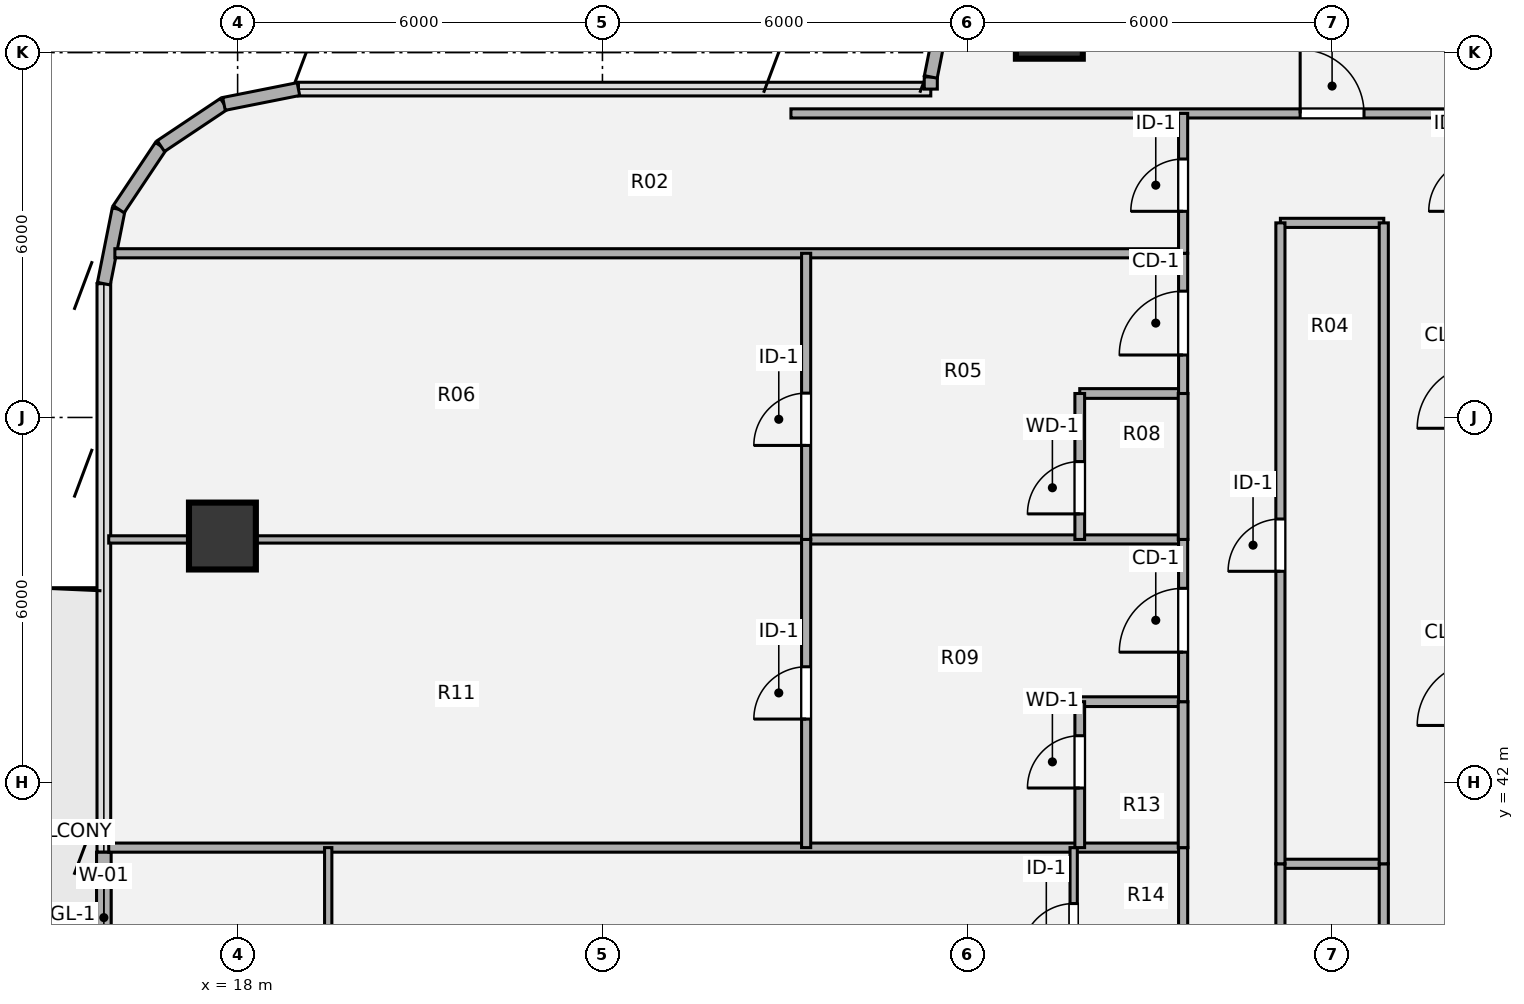
"""IFC4 building model, lengths in metres.
Left out: names, types, materials, properties, quantities, classifications, styles, units other than length and angle.
Written with IfcOpenShell. Run it as: python <this file> out.ifc"""

import sys

from ifc_helpers import new_model, si_unit, direction, frame, frame_2d, origin, origin_2d, place, context, subcontext, project, spatial, rectangle, hollow_circle, extrude, source, transform, mapped, element, fill, save


model = new_model("IFC4")
c1 = context("Model", 3, precision=1e-05, world=origin(), true_north=direction((0.0, 1.0)))
c2 = subcontext(c1, "Body", "Model", "MODEL_VIEW")
j1 = project(units=[si_unit("LENGTHUNIT", "METRE"), si_unit("PLANEANGLEUNIT", "RADIAN")], contexts=[c1])
p1 = place(None, origin())
s1 = spatial("IfcSite", under=j1, at=p1, CompositionType="ELEMENT")
p2 = place(p1, origin())
s2 = spatial("IfcBuilding", under=s1, at=p2, CompositionType="ELEMENT")
p3 = place(p2, frame((0.0, 0.0, 209.34)))
s3 = spatial("IfcBuildingStorey", under=s2, at=p3, CompositionType="ELEMENT", Elevation=209.34)
m1 = source(origin(), c2, "Body", "SweptSolid", [
    extrude(hollow_circle(Radius=0.55, WallThickness=0.04, at=origin_2d()), origin(), (0.0, 0.0, 1.0), 3.372),
])
for number, where, z_axis, x_axis in (
    (1, (17.75, 46.05, 0.0), (0.0, 0.0, 1.0), (1.0, 0.0, 0.0)),
    (2, (31.35, 54.45, 0.0), (0.0, 0.0, 1.0), (1.0, 0.0, 0.0)),
):
    element("IfcColumn", number, at=place(p3, frame(where, z_axis=z_axis, x_axis=x_axis)), inside=s3, PredefinedType="COLUMN", context=c2, shape_type="MappedRepresentation", body=[
        mapped(m1, transform((0.0, 0.0, 0.0), x_axis=(1.0, 0.0, 0.0), y_axis=(0.0, 1.0, 0.0), z_axis=(0.0, 0.0, 1.0), scale=1.0)),
    ])
p4 = place(p3, frame((15.8, 37.25, 0.0), z_axis=(0.0, 0.0, 1.0), x_axis=(0.0, 1.0, 0.0)))
e3 = element("IfcWall", 3, at=p4, inside=s3, PredefinedType="SOLIDWALL", context=c2, shape_type="SweptSolid", body=[
    extrude(rectangle(XDim=3.6, YDim=0.24, at=frame_2d((1.8, 0.0))), origin(), (0.0, 0.0, 1.0), 3.372),
])
p5 = place(p4, frame((0.4, 0.0, 0.0)))
e4 = element("IfcOpeningElement", 4, at=p5, cuts=e3, PredefinedType="OPENING", context=c2, shape_type="SweptSolid", body=[
    extrude(rectangle(XDim=1.05, YDim=2.15, at=origin_2d()), frame((0.525, 0.13, 1.075), z_axis=(0.0, -1.0, 0.0), x_axis=(1.0, 0.0, 0.0)), (0.0, 0.0, 1.0), 0.26),
])
p6 = place(p4, frame((1.85, 0.0, 0.85)))
e5 = element("IfcOpeningElement", 5, at=p6, cuts=e3, PredefinedType="OPENING", context=c2, shape_type="SweptSolid", body=[
    extrude(rectangle(XDim=1.35, YDim=1.35, at=origin_2d()), frame((0.675, 0.13, 0.675), z_axis=(0.0, -1.0, 0.0), x_axis=(1.0, 0.0, 0.0)), (0.0, 0.0, 1.0), 0.26),
])
for number, where, z_axis, x_axis in (
    (6, (15.8, 50.2, 0.0), (0.0, 0.0, 1.0), (0.195, 0.981, 0.0)),
    (7, (16.044, 51.425, 0.0), (0.0, 0.0, 1.0), (0.556, 0.831, 0.0)),
    (8, (16.737, 52.463, 0.0), (0.0, 0.0, 1.0), (0.831, 0.556, 0.0)),
    (9, (17.775, 53.156, 0.0), (0.0, 0.0, 1.0), (0.981, 0.195, 0.0)),
):
    element("IfcWall", number, at=place(p3, frame(where, z_axis=z_axis, x_axis=x_axis)), inside=s3, PredefinedType="SOLIDWALL", context=c2, shape_type="SweptSolid", body=[
        extrude(rectangle(XDim=1.249, YDim=0.215, at=frame_2d((0.624, 0.0))), origin(), (0.0, 0.0, 1.0), 3.372),
    ])
p7 = place(p3, frame((29.4, 53.4, 0.0), z_axis=(0.0, 0.0, 1.0), x_axis=(0.0, 1.0, 0.0)))
e10 = element("IfcWall", 10, at=p7, inside=s3, PredefinedType="SOLIDWALL", context=c2, shape_type="SweptSolid", body=[
    extrude(rectangle(XDim=0.2, YDim=0.215, at=frame_2d((0.1, 0.0))), origin(), (0.0, 0.0, 1.0), 3.372),
])
p8 = place(p3, frame((29.4, 53.6, 0.0), z_axis=(0.0, 0.0, 1.0), x_axis=(0.195127417394, 0.980777900945, 0.0)))
e11 = element("IfcWall", 11, at=p8, inside=s3, PredefinedType="SOLIDWALL", context=c2, shape_type="SweptSolid", body=[
    extrude(rectangle(XDim=1.092, YDim=0.215, at=frame_2d((0.546, 0.0))), origin(), (0.0, 0.0, 1.0), 3.372),
])
p9 = place(p3, frame((35.15, 40.66, 0.0), z_axis=(0.0, 0.0, 1.0), x_axis=(1.0, 0.0, 0.0)))
e12 = element("IfcWall", 12, at=p9, inside=s3, PredefinedType="PARTITIONING", context=c2, shape_type="SweptSolid", body=[
    extrude(rectangle(XDim=1.7, YDim=0.15, at=frame_2d((0.85, 0.0))), origin(), (0.0, 0.0, 1.0), 3.101),
])
p10 = place(p3, frame((15.88, 40.926, 0.0), z_axis=(0.0, 0.0, 1.0), x_axis=(1.0, 0.0, 0.0)))
e13 = element("IfcWall", 13, at=p10, inside=s3, PredefinedType="PARTITIONING", context=c2, shape_type="SweptSolid", body=[
    extrude(rectangle(XDim=17.67, YDim=0.15, at=frame_2d((8.835, 0.0))), origin(), (0.0, 0.0, 1.0), 2.824),
])
p11 = place(p3, frame((31.85, 43.326, 0.0), z_axis=(0.0, 0.0, 1.0), x_axis=(1.0, 0.0, 0.0)))
e14 = element("IfcWall", 14, at=p11, inside=s3, PredefinedType="PLUMBINGWALL", context=c2, shape_type="SweptSolid", body=[
    extrude(rectangle(XDim=1.7, YDim=0.16, at=frame_2d((0.85, 0.0))), origin(), (0.0, 0.0, 1.0), 3.101),
])
p12 = place(p3, frame((15.88, 45.994, 0.0), z_axis=(0.0, 0.0, 1.0), x_axis=(1.0, 0.0, 0.0)))
e15 = element("IfcWall", 15, at=p12, inside=s3, PredefinedType="PARTITIONING", context=c2, shape_type="SweptSolid", body=[
    extrude(rectangle(XDim=11.47, YDim=0.12, at=frame_2d((5.735, 0.0))), origin(), (0.0, 0.0, 1.0), 2.457),
])
p13 = place(p3, frame((27.35, 45.994, 0.0), z_axis=(0.0, 0.0, 1.0), x_axis=(1.0, 0.0, 0.0)))
e16 = element("IfcWall", 16, at=p13, inside=s3, PredefinedType="PARTITIONING", context=c2, shape_type="SweptSolid", body=[
    extrude(rectangle(XDim=6.2, YDim=0.15, at=frame_2d((3.1, 0.0))), origin(), (0.0, 0.0, 1.0), 2.457),
])
p14 = place(p3, frame((31.85, 48.394, 0.0), z_axis=(0.0, 0.0, 1.0), x_axis=(1.0, 0.0, 0.0)))
e17 = element("IfcWall", 17, at=p14, inside=s3, PredefinedType="PLUMBINGWALL", context=c2, shape_type="SweptSolid", body=[
    extrude(rectangle(XDim=1.7, YDim=0.16, at=frame_2d((0.85, 0.0))), origin(), (0.0, 0.0, 1.0), 3.101),
])
p15 = place(p3, frame((15.981, 50.7, 0.0), z_axis=(0.0, 0.0, 1.0), x_axis=(1.0, 0.0, 0.0)))
e18 = element("IfcWall", 18, at=p15, inside=s3, PredefinedType="PARTITIONING", context=c2, shape_type="SweptSolid", body=[
    extrude(rectangle(XDim=17.569, YDim=0.15, at=frame_2d((8.785, 0.0))), origin(), (0.0, 0.0, 1.0), 3.15),
])
p16 = place(p3, frame((35.15, 51.2, 0.0), z_axis=(0.0, 0.0, 1.0), x_axis=(1.0, 0.0, 0.0)))
e19 = element("IfcWall", 19, at=p16, inside=s3, PredefinedType="PARTITIONING", context=c2, shape_type="SweptSolid", body=[
    extrude(rectangle(XDim=1.7, YDim=0.15, at=frame_2d((0.85, 0.0))), origin(), (0.0, 0.0, 1.0), 3.15),
])
p17 = place(p3, frame((27.1, 53.0, 0.0), z_axis=(0.0, 0.0, 1.0), x_axis=(1.0, 0.0, 0.0)))
e20 = element("IfcWall", 20, at=p17, inside=s3, PredefinedType="PARTITIONING", context=c2, shape_type="SweptSolid", body=[
    extrude(rectangle(XDim=17.8, YDim=0.15, at=frame_2d((8.9, 0.0))), origin(), (0.0, 0.0, 1.0), 3.15),
])
p18 = place(p17, frame((8.375, 0.0, 0.0)))
e21 = element("IfcOpeningElement", 21, at=p18, cuts=e20, PredefinedType="OPENING", context=c2, shape_type="SweptSolid", body=[
    extrude(rectangle(XDim=1.05, YDim=2.1, at=origin_2d()), frame((0.525, 0.085, 1.05), z_axis=(0.0, -1.0, 0.0), x_axis=(1.0, 0.0, 0.0)), (0.0, 0.0, 1.0), 0.17),
])
p19 = place(p3, frame((19.49, 36.763, 0.0), z_axis=(0.0, 0.0, 1.0), x_axis=(0.0, 1.0, 0.0)))
e22 = element("IfcWall", 22, at=p19, inside=s3, PredefinedType="PARTITIONING", context=c2, shape_type="SweptSolid", body=[
    extrude(rectangle(XDim=4.163, YDim=0.12, at=frame_2d((2.082, 0.0))), origin(), (0.0, 0.0, 1.0), 3.342),
])
p20 = place(p19, frame((0.932, 0.0, 0.0)))
e23 = element("IfcOpeningElement", 23, at=p20, cuts=e22, PredefinedType="OPENING", context=c2, shape_type="SweptSolid", body=[
    extrude(rectangle(XDim=0.86, YDim=2.1, at=origin_2d()), frame((0.43, 0.07, 1.05), z_axis=(0.0, -1.0, 0.0), x_axis=(1.0, 0.0, 0.0)), (0.0, 0.0, 1.0), 0.14),
])
p21 = place(p3, frame((27.35, 40.926, 0.0), z_axis=(0.0, 0.0, 1.0), x_axis=(0.0, 1.0, 0.0)))
e24 = element("IfcWall", 24, at=p21, inside=s3, PredefinedType="PARTITIONING", context=c2, shape_type="SweptSolid", body=[
    extrude(rectangle(XDim=5.068, YDim=0.15, at=frame_2d((2.534, 0.0))), origin(), (0.0, 0.0, 1.0), 3.342),
])
p22 = place(p21, frame((2.114, 0.0, 0.0)))
e25 = element("IfcOpeningElement", 25, at=p22, cuts=e24, PredefinedType="OPENING", context=c2, shape_type="SweptSolid", body=[
    extrude(rectangle(XDim=0.86, YDim=2.1, at=origin_2d()), frame((0.43, 0.085, 1.05), z_axis=(0.0, -1.0, 0.0), x_axis=(1.0, 0.0, 0.0)), (0.0, 0.0, 1.0), 0.17),
])
p23 = place(p3, frame((27.35, 45.994, 0.0), z_axis=(0.0, 0.0, 1.0), x_axis=(0.0, 1.0, 0.0)))
e26 = element("IfcWall", 26, at=p23, inside=s3, PredefinedType="PARTITIONING", context=c2, shape_type="SweptSolid", body=[
    extrude(rectangle(XDim=4.706, YDim=0.15, at=frame_2d((2.353, 0.0))), origin(), (0.0, 0.0, 1.0), 3.342),
])
p24 = place(p23, frame((1.546, 0.0, 0.0)))
e27 = element("IfcOpeningElement", 27, at=p24, cuts=e26, PredefinedType="OPENING", context=c2, shape_type="SweptSolid", body=[
    extrude(rectangle(XDim=0.86, YDim=2.1, at=origin_2d()), frame((0.43, 0.085, 1.05), z_axis=(0.0, -1.0, 0.0), x_axis=(1.0, 0.0, 0.0)), (0.0, 0.0, 1.0), 0.17),
])
p25 = place(p3, frame((31.75, 38.526, 0.0), z_axis=(0.0, 0.0, 1.0), x_axis=(0.0, 1.0, 0.0)))
e28 = element("IfcWall", 28, at=p25, inside=s3, PredefinedType="PARTITIONING", context=c2, shape_type="SweptSolid", body=[
    extrude(rectangle(XDim=2.4, YDim=0.12, at=frame_2d((1.2, 0.0))), origin(), (0.0, 0.0, 1.0), 3.342),
])
p26 = place(p25, frame((0.62, 0.0, 0.0)))
e29 = element("IfcOpeningElement", 29, at=p26, cuts=e28, PredefinedType="OPENING", context=c2, shape_type="SweptSolid", body=[
    extrude(rectangle(XDim=0.86, YDim=2.1, at=origin_2d()), frame((0.43, 0.07, 1.05), z_axis=(0.0, -1.0, 0.0), x_axis=(1.0, 0.0, 0.0)), (0.0, 0.0, 1.0), 0.14),
])
p27 = place(p3, frame((31.85, 40.926, 0.0), z_axis=(0.0, 0.0, 1.0), x_axis=(0.0, 1.0, 0.0)))
e30 = element("IfcWall", 30, at=p27, inside=s3, PredefinedType="PLUMBINGWALL", context=c2, shape_type="SweptSolid", body=[
    extrude(rectangle(XDim=2.4, YDim=0.16, at=frame_2d((1.2, 0.0))), origin(), (0.0, 0.0, 1.0), 3.342),
])
p28 = place(p27, frame((0.98, 0.0, 0.0)))
e31 = element("IfcOpeningElement", 31, at=p28, cuts=e30, PredefinedType="OPENING", context=c2, shape_type="SweptSolid", body=[
    extrude(rectangle(XDim=0.86, YDim=2.1, at=origin_2d()), frame((0.43, 0.09, 1.05), z_axis=(0.0, -1.0, 0.0), x_axis=(1.0, 0.0, 0.0)), (0.0, 0.0, 1.0), 0.18),
])
p29 = place(p3, frame((31.85, 45.994, 0.0), z_axis=(0.0, 0.0, 1.0), x_axis=(0.0, 1.0, 0.0)))
e32 = element("IfcWall", 32, at=p29, inside=s3, PredefinedType="PLUMBINGWALL", context=c2, shape_type="SweptSolid", body=[
    extrude(rectangle(XDim=2.4, YDim=0.16, at=frame_2d((1.2, 0.0))), origin(), (0.0, 0.0, 1.0), 3.342),
])
p30 = place(p29, frame((0.42, 0.0, 0.0)))
e33 = element("IfcOpeningElement", 33, at=p30, cuts=e32, PredefinedType="OPENING", context=c2, shape_type="SweptSolid", body=[
    extrude(rectangle(XDim=0.86, YDim=2.1, at=origin_2d()), frame((0.43, 0.09, 1.05), z_axis=(0.0, -1.0, 0.0), x_axis=(1.0, 0.0, 0.0)), (0.0, 0.0, 1.0), 0.18),
])
p31 = place(p3, frame((33.55, 38.526, 0.0), z_axis=(0.0, 0.0, 1.0), x_axis=(0.0, 1.0, 0.0)))
e34 = element("IfcWall", 34, at=p31, inside=s3, PredefinedType="PARTITIONING", context=c2, shape_type="SweptSolid", body=[
    extrude(rectangle(XDim=2.4, YDim=0.15, at=frame_2d((1.2, 0.0))), origin(), (0.0, 0.0, 1.0), 3.342),
])
p32 = place(p3, frame((33.55, 40.926, 0.0), z_axis=(0.0, 0.0, 1.0), x_axis=(0.0, 1.0, 0.0)))
e35 = element("IfcWall", 35, at=p32, inside=s3, PredefinedType="PLUMBINGWALL", context=c2, shape_type="SweptSolid", body=[
    extrude(rectangle(XDim=2.4, YDim=0.16, at=frame_2d((1.2, 0.0))), origin(), (0.0, 0.0, 1.0), 3.342),
])
p33 = place(p3, frame((33.55, 43.326, 0.0), z_axis=(0.0, 0.0, 1.0), x_axis=(0.0, 1.0, 0.0)))
e36 = element("IfcWall", 36, at=p33, inside=s3, PredefinedType="PARTITIONING", context=c2, shape_type="SweptSolid", body=[
    extrude(rectangle(XDim=2.668, YDim=0.15, at=frame_2d((1.334, 0.0))), origin(), (0.0, 0.0, 1.0), 3.342),
])
p34 = place(p33, frame((0.814, 0.0, 0.0)))
e37 = element("IfcOpeningElement", 37, at=p34, cuts=e36, PredefinedType="OPENING", context=c2, shape_type="SweptSolid", body=[
    extrude(rectangle(XDim=1.05, YDim=2.1, at=origin_2d()), frame((0.525, 0.085, 1.05), z_axis=(0.0, -1.0, 0.0), x_axis=(1.0, 0.0, 0.0)), (0.0, 0.0, 1.0), 0.17),
])
p35 = place(p3, frame((33.55, 45.994, 0.0), z_axis=(0.0, 0.0, 1.0), x_axis=(0.0, 1.0, 0.0)))
e38 = element("IfcWall", 38, at=p35, inside=s3, PredefinedType="PLUMBINGWALL", context=c2, shape_type="SweptSolid", body=[
    extrude(rectangle(XDim=2.4, YDim=0.16, at=frame_2d((1.2, 0.0))), origin(), (0.0, 0.0, 1.0), 3.342),
])
p36 = place(p3, frame((33.55, 48.394, 0.0), z_axis=(0.0, 0.0, 1.0), x_axis=(0.0, 1.0, 0.0)))
e39 = element("IfcWall", 39, at=p36, inside=s3, PredefinedType="PARTITIONING", context=c2, shape_type="SweptSolid", body=[
    extrude(rectangle(XDim=2.306, YDim=0.15, at=frame_2d((1.153, 0.0))), origin(), (0.0, 0.0, 1.0), 3.342),
])
p37 = place(p36, frame((0.633, 0.0, 0.0)))
e40 = element("IfcOpeningElement", 40, at=p37, cuts=e39, PredefinedType="OPENING", context=c2, shape_type="SweptSolid", body=[
    extrude(rectangle(XDim=1.05, YDim=2.1, at=origin_2d()), frame((0.525, 0.085, 1.05), z_axis=(0.0, -1.0, 0.0), x_axis=(1.0, 0.0, 0.0)), (0.0, 0.0, 1.0), 0.17),
])
p38 = place(p3, frame((33.55, 50.7, 0.0), z_axis=(0.0, 0.0, 1.0), x_axis=(0.0, 1.0, 0.0)))
e41 = element("IfcWall", 41, at=p38, inside=s3, PredefinedType="PARTITIONING", context=c2, shape_type="SweptSolid", body=[
    extrude(rectangle(XDim=2.3, YDim=0.15, at=frame_2d((1.15, 0.0))), origin(), (0.0, 0.0, 1.0), 3.342),
])
p39 = place(p38, frame((0.69, 0.0, 0.0)))
e42 = element("IfcOpeningElement", 42, at=p39, cuts=e41, PredefinedType="OPENING", context=c2, shape_type="SweptSolid", body=[
    extrude(rectangle(XDim=0.86, YDim=2.1, at=origin_2d()), frame((0.43, 0.085, 1.05), z_axis=(0.0, -1.0, 0.0), x_axis=(1.0, 0.0, 0.0)), (0.0, 0.0, 1.0), 0.17),
])
p40 = place(p3, frame((35.15, 25.2, 0.0), z_axis=(0.0, 0.0, 1.0), x_axis=(0.0, 1.0, 0.0)))
e43 = element("IfcWall", 43, at=p40, inside=s3, PredefinedType="PARTITIONING", context=c2, shape_type="SweptSolid", body=[
    extrude(rectangle(XDim=15.46, YDim=0.15, at=frame_2d((7.73, 0.0))), origin(), (0.0, 0.0, 1.0), 3.342),
])
p41 = place(p3, frame((35.15, 40.66, 0.0), z_axis=(0.0, 0.0, 1.0), x_axis=(0.0, 1.0, 0.0)))
e44 = element("IfcWall", 44, at=p41, inside=s3, PredefinedType="PARTITIONING", context=c2, shape_type="SweptSolid", body=[
    extrude(rectangle(XDim=10.54, YDim=0.15, at=frame_2d((5.27, 0.0))), origin(), (0.0, 0.0, 1.0), 3.342),
])
p42 = place(p41, frame((4.81, 0.0, 0.0)))
e45 = element("IfcOpeningElement", 45, at=p42, cuts=e44, PredefinedType="OPENING", context=c2, shape_type="SweptSolid", body=[
    extrude(rectangle(XDim=0.86, YDim=2.1, at=origin_2d()), frame((0.43, 0.085, 1.05), z_axis=(0.0, -1.0, 0.0), x_axis=(1.0, 0.0, 0.0)), (0.0, 0.0, 1.0), 0.17),
])
p43 = place(p3, frame((36.85, 25.2, 0.0), z_axis=(0.0, 0.0, 1.0), x_axis=(0.0, 1.0, 0.0)))
e46 = element("IfcWall", 46, at=p43, inside=s3, PredefinedType="PARTITIONING", context=c2, shape_type="SweptSolid", body=[
    extrude(rectangle(XDim=15.46, YDim=0.15, at=frame_2d((7.73, 0.0))), origin(), (0.0, 0.0, 1.0), 3.342),
])
p44 = place(p43, frame((7.205, 0.0, 0.0)))
e47 = element("IfcOpeningElement", 47, at=p44, cuts=e46, PredefinedType="OPENING", context=c2, shape_type="SweptSolid", body=[
    extrude(rectangle(XDim=1.05, YDim=2.1, at=origin_2d()), frame((0.525, 0.085, 1.05), z_axis=(0.0, -1.0, 0.0), x_axis=(1.0, 0.0, 0.0)), (0.0, 0.0, 1.0), 0.17),
])
p45 = place(p3, frame((36.85, 40.66, 0.0), z_axis=(0.0, 0.0, 1.0), x_axis=(0.0, 1.0, 0.0)))
e48 = element("IfcWall", 48, at=p45, inside=s3, PredefinedType="PARTITIONING", context=c2, shape_type="SweptSolid", body=[
    extrude(rectangle(XDim=10.54, YDim=0.15, at=frame_2d((5.27, 0.0))), origin(), (0.0, 0.0, 1.0), 3.342),
])
m2 = source(origin(), c2, "Body", "SweptSolid", [
    extrude(rectangle(XDim=1.35, YDim=1.35, at=origin_2d()), frame((0.675, 0.03, 0.675), z_axis=(0.0, -1.0, 0.0), x_axis=(1.0, 0.0, 0.0)), (0.0, 0.0, 1.0), 0.06),
])
p46 = place(p6, origin())
e49 = element("IfcWindow", 49, at=p46, inside=s3, PartitioningType="SINGLE_PANEL", PredefinedType="WINDOW", context=c2, shape_type="MappedRepresentation", body=[
    mapped(m2, transform((0.0, 0.0, 0.0), x_axis=(1.0, 0.0, 0.0), y_axis=(0.0, 1.0, 0.0), z_axis=(0.0, 0.0, 1.0), scale=1.0)),
])
fill(e5, e49)
m3 = source(origin(), c2, "Body", "SweptSolid", [
    extrude(rectangle(XDim=1.05, YDim=2.1, at=origin_2d()), frame((0.525, 0.025, 1.05), z_axis=(0.0, -1.0, 0.0), x_axis=(1.0, 0.0, 0.0)), (0.0, 0.0, 1.0), 0.05),
])
p47 = place(p18, origin())
e50 = element("IfcDoor", 50, at=p47, inside=s3, OperationType="SINGLE_SWING_LEFT", PredefinedType="DOOR", context=c2, shape_type="MappedRepresentation", body=[
    mapped(m3, transform((0.0, 0.0, 0.0), x_axis=(1.0, 0.0, 0.0), y_axis=(0.0, 1.0, 0.0), z_axis=(0.0, 0.0, 1.0), scale=1.0)),
])
fill(e21, e50)
m4 = source(origin(), c2, "Body", "SweptSolid", [
    extrude(rectangle(XDim=0.86, YDim=2.1, at=origin_2d()), frame((0.43, 0.025, 1.05), z_axis=(0.0, -1.0, 0.0), x_axis=(1.0, 0.0, 0.0)), (0.0, 0.0, 1.0), 0.05),
])
p48 = place(p22, origin())
e51 = element("IfcDoor", 51, at=p48, inside=s3, OperationType="SINGLE_SWING_LEFT", PredefinedType="DOOR", context=c2, shape_type="MappedRepresentation", body=[
    mapped(m4, transform((0.0, 0.0, 0.0), x_axis=(1.0, 0.0, 0.0), y_axis=(0.0, 1.0, 0.0), z_axis=(0.0, 0.0, 1.0), scale=1.0)),
])
fill(e25, e51)
p49 = place(p24, origin())
e52 = element("IfcDoor", 52, at=p49, inside=s3, OperationType="SINGLE_SWING_LEFT", PredefinedType="DOOR", context=c2, shape_type="MappedRepresentation", body=[
    mapped(m4, transform((0.0, 0.0, 0.0), x_axis=(1.0, 0.0, 0.0), y_axis=(0.0, 1.0, 0.0), z_axis=(0.0, 0.0, 1.0), scale=1.0)),
])
fill(e27, e52)
p50 = place(p26, origin())
e53 = element("IfcDoor", 53, at=p50, inside=s3, OperationType="SINGLE_SWING_LEFT", PredefinedType="DOOR", context=c2, shape_type="MappedRepresentation", body=[
    mapped(m4, transform((0.0, 0.0, 0.0), x_axis=(1.0, 0.0, 0.0), y_axis=(0.0, 1.0, 0.0), z_axis=(0.0, 0.0, 1.0), scale=1.0)),
])
fill(e29, e53)
m5 = source(origin(), c2, "Body", "SweptSolid", [
    extrude(rectangle(XDim=0.86, YDim=2.1, at=origin_2d()), frame((0.43, 0.025, 1.05), z_axis=(0.0, -1.0, 0.0), x_axis=(1.0, 0.0, 0.0)), (0.0, 0.0, 1.0), 0.05),
])
p51 = place(p28, origin())
e54 = element("IfcDoor", 54, at=p51, inside=s3, OperationType="SINGLE_SWING_LEFT", PredefinedType="DOOR", context=c2, shape_type="MappedRepresentation", body=[
    mapped(m5, transform((0.0, 0.0, 0.0), x_axis=(1.0, 0.0, 0.0), y_axis=(0.0, 1.0, 0.0), z_axis=(0.0, 0.0, 1.0), scale=1.0)),
])
fill(e31, e54)
p52 = place(p30, origin())
e55 = element("IfcDoor", 55, at=p52, inside=s3, OperationType="SINGLE_SWING_LEFT", PredefinedType="DOOR", context=c2, shape_type="MappedRepresentation", body=[
    mapped(m5, transform((0.0, 0.0, 0.0), x_axis=(1.0, 0.0, 0.0), y_axis=(0.0, 1.0, 0.0), z_axis=(0.0, 0.0, 1.0), scale=1.0)),
])
fill(e33, e55)
m6 = source(origin(), c2, "Body", "SweptSolid", [
    extrude(rectangle(XDim=1.05, YDim=2.1, at=origin_2d()), frame((0.525, 0.025, 1.05), z_axis=(0.0, -1.0, 0.0), x_axis=(1.0, 0.0, 0.0)), (0.0, 0.0, 1.0), 0.05),
])
p53 = place(p34, origin())
e56 = element("IfcDoor", 56, at=p53, inside=s3, OperationType="SINGLE_SWING_LEFT", PredefinedType="DOOR", context=c2, shape_type="MappedRepresentation", body=[
    mapped(m6, transform((0.0, 0.0, 0.0), x_axis=(1.0, 0.0, 0.0), y_axis=(0.0, 1.0, 0.0), z_axis=(0.0, 0.0, 1.0), scale=1.0)),
])
fill(e37, e56)
p54 = place(p37, origin())
e57 = element("IfcDoor", 57, at=p54, inside=s3, OperationType="SINGLE_SWING_LEFT", PredefinedType="DOOR", context=c2, shape_type="MappedRepresentation", body=[
    mapped(m6, transform((0.0, 0.0, 0.0), x_axis=(1.0, 0.0, 0.0), y_axis=(0.0, 1.0, 0.0), z_axis=(0.0, 0.0, 1.0), scale=1.0)),
])
fill(e40, e57)
p55 = place(p39, origin())
e58 = element("IfcDoor", 58, at=p55, inside=s3, OperationType="SINGLE_SWING_LEFT", PredefinedType="DOOR", context=c2, shape_type="MappedRepresentation", body=[
    mapped(m4, transform((0.0, 0.0, 0.0), x_axis=(1.0, 0.0, 0.0), y_axis=(0.0, 1.0, 0.0), z_axis=(0.0, 0.0, 1.0), scale=1.0)),
])
fill(e42, e58)
p56 = place(p42, origin())
e59 = element("IfcDoor", 59, at=p56, inside=s3, OperationType="SINGLE_SWING_LEFT", PredefinedType="DOOR", context=c2, shape_type="MappedRepresentation", body=[
    mapped(m4, transform((0.0, 0.0, 0.0), x_axis=(1.0, 0.0, 0.0), y_axis=(0.0, 1.0, 0.0), z_axis=(0.0, 0.0, 1.0), scale=1.0)),
])
fill(e45, e59)
save(model, sys.argv[1])
